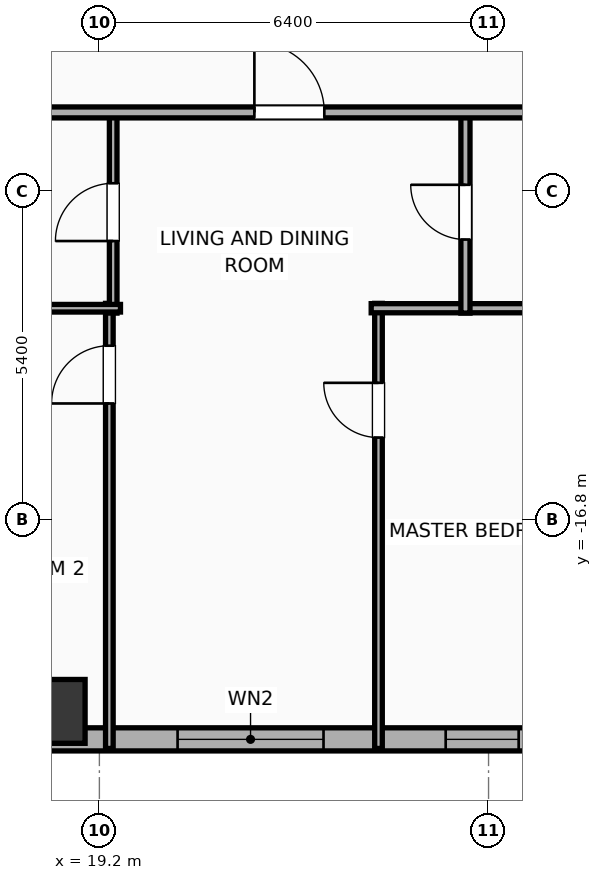
"""IFC4 building model, lengths in metres.
Left out: names, types, materials, properties, quantities, classifications, styles, units other than length and angle.
Written with IfcOpenShell. Run it as: python <this file> out.ifc"""

import sys

from ifc_helpers import new_model, si_unit, direction, frame, frame_2d, origin, origin_2d, place, context, subcontext, project, spatial, rectangle, hollow_rectangle, extrude, element, fill, save


model = new_model("IFC4")
c1 = context("Model", 3, precision=1e-05, world=origin(), true_north=direction((0.0, 1.0)))
c2 = subcontext(c1, "Body", "Model", "MODEL_VIEW")
j1 = project(units=[si_unit("LENGTHUNIT", "METRE"), si_unit("PLANEANGLEUNIT", "RADIAN")], contexts=[c1])
p1 = place(None, origin())
s1 = spatial("IfcSite", under=j1, at=p1, CompositionType="ELEMENT")
p2 = place(p1, origin())
s2 = spatial("IfcBuilding", under=s1, at=p2, CompositionType="ELEMENT")
p3 = place(p2, frame((0.0, 0.0, 105.3)))
s3 = spatial("IfcBuildingStorey", under=s2, at=p3, CompositionType="ELEMENT", Elevation=105.3)
p4 = place(p3, frame((18.44, -19.95, 0.0), z_axis=(0.0, 0.0, 1.0), x_axis=(1.0, 0.0, 0.0)))
e1 = element("IfcColumn", 1, at=p4, inside=s3, PredefinedType="COLUMN", context=c2, shape_type="SweptSolid", body=[
    extrude(hollow_rectangle(XDim=1.05, YDim=1.05, WallThickness=0.036, at=origin_2d()), origin(), (0.0, 0.0, 1.0), 3.9),
])
p5 = place(p3, frame((29.381, -20.41, 0.0), z_axis=(0.0, 0.0, 1.0), x_axis=(-1.0, 0.0, 0.0)))
e2 = element("IfcWall", 2, at=p5, inside=s3, PredefinedType="ELEMENTEDWALL", context=c2, shape_type="SweptSolid", body=[
    extrude(rectangle(XDim=54.763, YDim=0.38, at=frame_2d((27.381, 0.0))), origin(), (0.0, 0.0, 1.0), 3.65),
])
p6 = place(p5, frame((6.495, 0.0, 0.75)))
e3 = element("IfcOpeningElement", 3, at=p6, cuts=e2, PredefinedType="OPENING", context=c2, shape_type="SweptSolid", body=[
    extrude(rectangle(XDim=2.4, YDim=2.1, at=frame_2d((1.2, 1.05))), frame((0.0, 0.2, 0.0), z_axis=(0.0, -1.0, 0.0), x_axis=(1.0, 0.0, 0.0)), (0.0, 0.0, 1.0), 0.4),
])
p7 = place(p5, frame((17.686, 0.0, 0.75)))
e4 = element("IfcOpeningElement", 4, at=p7, cuts=e2, PredefinedType="OPENING", context=c2, shape_type="SweptSolid", body=[
    extrude(rectangle(XDim=2.4, YDim=2.1, at=frame_2d((1.2, 1.05))), frame((0.0, 0.2, 0.0), z_axis=(0.0, -1.0, 0.0), x_axis=(1.0, 0.0, 0.0)), (0.0, 0.0, 1.0), 0.4),
])
p8 = place(p5, frame((34.677, 0.0, 0.75)))
e5 = element("IfcOpeningElement", 5, at=p8, cuts=e2, PredefinedType="OPENING", context=c2, shape_type="SweptSolid", body=[
    extrude(rectangle(XDim=2.4, YDim=2.1, at=frame_2d((1.2, 1.05))), frame((0.0, 0.2, 0.0), z_axis=(0.0, -1.0, 0.0), x_axis=(1.0, 0.0, 0.0)), (0.0, 0.0, 1.0), 0.4),
])
p9 = place(p5, frame((45.867, 0.0, 0.75)))
e6 = element("IfcOpeningElement", 6, at=p9, cuts=e2, PredefinedType="OPENING", context=c2, shape_type="SweptSolid", body=[
    extrude(rectangle(XDim=2.4, YDim=2.1, at=frame_2d((1.2, 1.05))), frame((0.0, 0.2, 0.0), z_axis=(0.0, -1.0, 0.0), x_axis=(1.0, 0.0, 0.0)), (0.0, 0.0, 1.0), 0.4),
])
p10 = place(p5, frame((52.281, 0.0, 0.75)))
e7 = element("IfcOpeningElement", 7, at=p10, cuts=e2, PredefinedType="OPENING", context=c2, shape_type="SweptSolid", body=[
    extrude(rectangle(XDim=1.2, YDim=2.05, at=frame_2d((0.6, 1.025))), frame((0.0, 0.2, 0.0), z_axis=(0.0, -1.0, 0.0), x_axis=(1.0, 0.0, 0.0)), (0.0, 0.0, 1.0), 0.4),
])
p11 = place(p5, frame((49.641, 0.0, 0.75)))
e8 = element("IfcOpeningElement", 8, at=p11, cuts=e2, PredefinedType="OPENING", context=c2, shape_type="SweptSolid", body=[
    extrude(rectangle(XDim=1.2, YDim=2.05, at=frame_2d((0.6, 1.025))), frame((0.0, 0.2, 0.0), z_axis=(0.0, -1.0, 0.0), x_axis=(1.0, 0.0, 0.0)), (0.0, 0.0, 1.0), 0.4),
])
p12 = place(p5, frame((39.543, 0.0, 0.75)))
e9 = element("IfcOpeningElement", 9, at=p12, cuts=e2, PredefinedType="OPENING", context=c2, shape_type="SweptSolid", body=[
    extrude(rectangle(XDim=1.2, YDim=2.05, at=frame_2d((0.6, 1.025))), frame((0.0, 0.2, 0.0), z_axis=(0.0, -1.0, 0.0), x_axis=(1.0, 0.0, 0.0)), (0.0, 0.0, 1.0), 0.4),
])
p13 = place(p5, frame((44.538, 0.0, 0.75)))
e10 = element("IfcOpeningElement", 10, at=p13, cuts=e2, PredefinedType="OPENING", context=c2, shape_type="SweptSolid", body=[
    extrude(rectangle(XDim=0.52, YDim=2.05, at=frame_2d((0.26, 1.025))), frame((0.0, 0.2, 0.0), z_axis=(0.0, -1.0, 0.0), x_axis=(1.0, 0.0, 0.0)), (0.0, 0.0, 1.0), 0.4),
])
p14 = place(p5, frame((28.206, 0.0, 0.75)))
e11 = element("IfcOpeningElement", 11, at=p14, cuts=e2, PredefinedType="OPENING", context=c2, shape_type="SweptSolid", body=[
    extrude(rectangle(XDim=1.2, YDim=2.05, at=frame_2d((0.6, 1.025))), frame((0.0, 0.2, 0.0), z_axis=(0.0, -1.0, 0.0), x_axis=(1.0, 0.0, 0.0)), (0.0, 0.0, 1.0), 0.4),
])
p15 = place(p5, frame((31.241, 0.0, 0.75)))
e12 = element("IfcOpeningElement", 12, at=p15, cuts=e2, PredefinedType="OPENING", context=c2, shape_type="SweptSolid", body=[
    extrude(rectangle(XDim=0.85, YDim=2.05, at=frame_2d((0.425, 1.025))), frame((0.0, 0.2, 0.0), z_axis=(0.0, -1.0, 0.0), x_axis=(1.0, 0.0, 0.0)), (0.0, 0.0, 1.0), 0.4),
])
p16 = place(p5, frame((24.561, 0.0, 0.75)))
e13 = element("IfcOpeningElement", 13, at=p16, cuts=e2, PredefinedType="OPENING", context=c2, shape_type="SweptSolid", body=[
    extrude(rectangle(XDim=1.2, YDim=2.05, at=frame_2d((0.6, 1.025))), frame((0.0, 0.2, 0.0), z_axis=(0.0, -1.0, 0.0), x_axis=(1.0, 0.0, 0.0)), (0.0, 0.0, 1.0), 0.4),
])
p17 = place(p5, frame((22.561, 0.0, 0.75)))
e14 = element("IfcOpeningElement", 14, at=p17, cuts=e2, PredefinedType="OPENING", context=c2, shape_type="SweptSolid", body=[
    extrude(rectangle(XDim=0.52, YDim=2.05, at=frame_2d((0.26, 1.025))), frame((0.0, 0.2, 0.0), z_axis=(0.0, -1.0, 0.0), x_axis=(1.0, 0.0, 0.0)), (0.0, 0.0, 1.0), 0.4),
])
p18 = place(p5, frame((13.886, 0.0, 0.75)))
e15 = element("IfcOpeningElement", 15, at=p18, cuts=e2, PredefinedType="OPENING", context=c2, shape_type="SweptSolid", body=[
    extrude(rectangle(XDim=1.2, YDim=2.05, at=frame_2d((0.6, 1.025))), frame((0.0, 0.2, 0.0), z_axis=(0.0, -1.0, 0.0), x_axis=(1.0, 0.0, 0.0)), (0.0, 0.0, 1.0), 0.4),
])
p19 = place(p5, frame((11.694, 0.0, 0.75)))
e16 = element("IfcOpeningElement", 16, at=p19, cuts=e2, PredefinedType="OPENING", context=c2, shape_type="SweptSolid", body=[
    extrude(rectangle(XDim=0.85, YDim=2.05, at=frame_2d((0.425, 1.025))), frame((0.0, 0.2, 0.0), z_axis=(0.0, -1.0, 0.0), x_axis=(1.0, 0.0, 0.0)), (0.0, 0.0, 1.0), 0.4),
])
p20 = place(p5, frame((3.286, 0.0, 0.75)))
e17 = element("IfcOpeningElement", 17, at=p20, cuts=e2, PredefinedType="OPENING", context=c2, shape_type="SweptSolid", body=[
    extrude(rectangle(XDim=1.2, YDim=2.05, at=frame_2d((0.6, 1.025))), frame((0.0, 0.2, 0.0), z_axis=(0.0, -1.0, 0.0), x_axis=(1.0, 0.0, 0.0)), (0.0, 0.0, 1.0), 0.4),
])
p21 = place(p5, frame((0.816, 0.0, 0.75)))
e18 = element("IfcOpeningElement", 18, at=p21, cuts=e2, PredefinedType="OPENING", context=c2, shape_type="SweptSolid", body=[
    extrude(rectangle(XDim=1.2, YDim=2.05, at=frame_2d((0.6, 1.025))), frame((0.0, 0.2, 0.0), z_axis=(0.0, -1.0, 0.0), x_axis=(1.0, 0.0, 0.0)), (0.0, 0.0, 1.0), 0.4),
])
p22 = place(p3, frame((19.364, -20.56, 0.0), z_axis=(0.0, 0.0, 1.0), x_axis=(0.0, 1.0, 0.0)))
e19 = element("IfcWall", 19, at=p22, inside=s3, PredefinedType="PARTITIONING", context=c2, shape_type="SweptSolid", body=[
    extrude(rectangle(XDim=7.32, YDim=0.125, at=frame_2d((3.66, 0.0))), origin(), (0.0, 0.0, 1.0), 3.65),
])
p23 = place(p22, frame((5.674, 0.0, 0.0)))
e20 = element("IfcOpeningElement", 20, at=p23, cuts=e19, PredefinedType="OPENING", context=c2, shape_type="SweptSolid", body=[
    extrude(rectangle(XDim=0.95, YDim=2.05, at=frame_2d((0.475, 1.025))), frame((0.0, 0.073, 0.0), z_axis=(0.0, -1.0, 0.0), x_axis=(1.0, 0.0, 0.0)), (0.0, 0.0, 1.0), 0.145),
])
p24 = place(p3, frame((23.79, -20.56, 0.0), z_axis=(0.0, 0.0, 1.0), x_axis=(0.0, 1.0, 0.0)))
e21 = element("IfcWall", 21, at=p24, inside=s3, PredefinedType="PARTITIONING", context=c2, shape_type="SweptSolid", body=[
    extrude(rectangle(XDim=7.32, YDim=0.125, at=frame_2d((3.66, 0.0))), origin(), (0.0, 0.0, 1.0), 3.65),
])
p25 = place(p24, frame((5.113, 0.0, 0.0)))
e22 = element("IfcOpeningElement", 22, at=p25, cuts=e21, PredefinedType="OPENING", context=c2, shape_type="SweptSolid", body=[
    extrude(rectangle(XDim=0.9, YDim=2.05, at=frame_2d((0.45, 1.025))), frame((0.0, 0.073, 0.0), z_axis=(0.0, -1.0, 0.0), x_axis=(1.0, 0.0, 0.0)), (0.0, 0.0, 1.0), 0.145),
])
p26 = place(p3, frame((23.67, -13.32, 0.0), z_axis=(0.0, 0.0, 1.0), x_axis=(1.0, 0.0, 0.0)))
e23 = element("IfcWall", 23, at=p26, inside=s3, PredefinedType="PLUMBINGWALL", context=c2, shape_type="SweptSolid", body=[
    extrude(rectangle(XDim=3.79, YDim=0.15, at=frame_2d((1.895, 0.0))), origin(), (0.0, 0.0, 1.0), 3.65),
])
p27 = place(p3, frame((19.427, -13.4, 0.0), z_axis=(0.0, 0.0, 1.0), x_axis=(0.0, 1.0, 0.0)))
e24 = element("IfcWall", 24, at=p27, inside=s3, PredefinedType="PARTITIONING", context=c2, shape_type="SweptSolid", body=[
    extrude(rectangle(XDim=3.32, YDim=0.125, at=frame_2d((1.66, 0.0))), origin(), (0.0, 0.0, 1.0), 3.65),
])
p28 = place(p27, frame((1.185, 0.0, 0.0)))
e25 = element("IfcOpeningElement", 25, at=p28, cuts=e24, PredefinedType="OPENING", context=c2, shape_type="SweptSolid", body=[
    extrude(rectangle(XDim=0.95, YDim=2.05, at=frame_2d((0.475, 1.025))), frame((0.0, 0.073, 0.0), z_axis=(0.0, -1.0, 0.0), x_axis=(1.0, 0.0, 0.0)), (0.0, 0.0, 1.0), 0.145),
])
p29 = place(p3, frame((16.525, -13.32, 0.0), z_axis=(0.0, 0.0, 1.0), x_axis=(1.0, 0.0, 0.0)))
e26 = element("IfcWall", 26, at=p29, inside=s3, PredefinedType="PARTITIONING", context=c2, shape_type="SweptSolid", body=[
    extrude(rectangle(XDim=3.022, YDim=0.125, at=frame_2d((1.511, 0.0))), origin(), (0.0, 0.0, 1.0), 3.65),
])
p30 = place(p3, frame((25.22, -13.4, 0.0), z_axis=(0.0, 0.0, 1.0), x_axis=(0.0, 1.0, 0.0)))
e27 = element("IfcWall", 27, at=p30, inside=s3, PredefinedType="PLUMBINGWALL", context=c2, shape_type="SweptSolid", body=[
    extrude(rectangle(XDim=3.32, YDim=0.15, at=frame_2d((1.66, 0.0))), origin(), (0.0, 0.0, 1.0), 3.65),
])
p31 = place(p30, frame((1.21, 0.0, 0.0)))
e28 = element("IfcOpeningElement", 28, at=p31, cuts=e27, PredefinedType="OPENING", context=c2, shape_type="SweptSolid", body=[
    extrude(rectangle(XDim=0.9, YDim=2.05, at=frame_2d((0.45, 1.025))), frame((0.0, 0.085, 0.0), z_axis=(0.0, -1.0, 0.0), x_axis=(1.0, 0.0, 0.0)), (0.0, 0.0, 1.0), 0.17),
])
p32 = place(p3, frame((-29.21, -10.1, 0.0), z_axis=(0.0, 0.0, 1.0), x_axis=(1.0, 0.0, 0.0)))
e29 = element("IfcWall", 29, at=p32, inside=s3, PredefinedType="PARTITIONING", context=c2, shape_type="SweptSolid", body=[
    extrude(rectangle(XDim=62.42, YDim=0.18, at=frame_2d((31.21, 0.0))), origin(), (0.0, 0.0, 1.0), 3.65),
])
p33 = place(p32, frame((3.033, 0.0, 0.0)))
e30 = element("IfcOpeningElement", 30, at=p33, cuts=e29, PredefinedType="OPENING", context=c2, shape_type="SweptSolid", body=[
    extrude(rectangle(XDim=0.9, YDim=2.05, at=frame_2d((0.45, 1.025))), frame((0.0, 0.1, 0.0), z_axis=(0.0, -1.0, 0.0), x_axis=(1.0, 0.0, 0.0)), (0.0, 0.0, 1.0), 0.2),
])
p34 = place(p32, frame((9.768, 0.0, 0.0)))
e31 = element("IfcOpeningElement", 31, at=p34, cuts=e29, PredefinedType="OPENING", context=c2, shape_type="SweptSolid", body=[
    extrude(rectangle(XDim=0.9, YDim=2.05, at=frame_2d((0.45, 1.025))), frame((0.0, 0.1, 0.0), z_axis=(0.0, -1.0, 0.0), x_axis=(1.0, 0.0, 0.0)), (0.0, 0.0, 1.0), 0.2),
])
p35 = place(p32, frame((18.65, 0.0, 0.0)))
e32 = element("IfcOpeningElement", 32, at=p35, cuts=e29, PredefinedType="OPENING", context=c2, shape_type="SweptSolid", body=[
    extrude(rectangle(XDim=1.15, YDim=2.05, at=frame_2d((0.575, 1.025))), frame((0.0, 0.1, 0.0), z_axis=(0.0, -1.0, 0.0), x_axis=(1.0, 0.0, 0.0)), (0.0, 0.0, 1.0), 0.2),
])
p36 = place(p32, frame((29.212, 0.0, 0.0)))
e33 = element("IfcOpeningElement", 33, at=p36, cuts=e29, PredefinedType="OPENING", context=c2, shape_type="SweptSolid", body=[
    extrude(rectangle(XDim=1.15, YDim=2.05, at=frame_2d((0.575, 1.025))), frame((0.0, 0.1, 0.0), z_axis=(0.0, -1.0, 0.0), x_axis=(1.0, 0.0, 0.0)), (0.0, 0.0, 1.0), 0.2),
])
p37 = place(p32, frame((40.379, 0.0, 0.0)))
e34 = element("IfcOpeningElement", 34, at=p37, cuts=e29, PredefinedType="OPENING", context=c2, shape_type="SweptSolid", body=[
    extrude(rectangle(XDim=1.15, YDim=2.05, at=frame_2d((0.575, 1.025))), frame((0.0, 0.1, 0.0), z_axis=(0.0, -1.0, 0.0), x_axis=(1.0, 0.0, 0.0)), (0.0, 0.0, 1.0), 0.2),
])
p38 = place(p32, frame((50.959, 0.0, 0.0)))
e35 = element("IfcOpeningElement", 35, at=p38, cuts=e29, PredefinedType="OPENING", context=c2, shape_type="SweptSolid", body=[
    extrude(rectangle(XDim=1.15, YDim=2.05, at=frame_2d((0.575, 1.025))), frame((0.0, 0.1, 0.0), z_axis=(0.0, -1.0, 0.0), x_axis=(1.0, 0.0, 0.0)), (0.0, 0.0, 1.0), 0.2),
])
p39 = place(p32, frame((59.117, 0.0, 0.0)))
e36 = element("IfcOpeningElement", 36, at=p39, cuts=e29, PredefinedType="OPENING", context=c2, shape_type="SweptSolid", body=[
    extrude(rectangle(XDim=0.9, YDim=2.05, at=frame_2d((0.45, 1.025))), frame((0.0, 0.1, 0.0), z_axis=(0.0, -1.0, 0.0), x_axis=(1.0, 0.0, 0.0)), (0.0, 0.0, 1.0), 0.2),
])
p40 = place(p6, origin())
e37 = element("IfcWindow", 37, at=p40, inside=s3, PartitioningType="SINGLE_PANEL", PredefinedType="WINDOW", context=c2, shape_type="SweptSolid", body=[
    extrude(rectangle(XDim=2.4, YDim=2.1, at=frame_2d((1.2, 1.05))), frame((0.0, 0.03, 0.0), z_axis=(0.0, -1.0, 0.0), x_axis=(1.0, 0.0, 0.0)), (0.0, 0.0, 1.0), 0.06),
])
fill(e3, e37)
p41 = place(p20, origin())
e38 = element("IfcWindow", 38, at=p41, inside=s3, PartitioningType="SINGLE_PANEL", PredefinedType="WINDOW", context=c2, shape_type="SweptSolid", body=[
    extrude(rectangle(XDim=1.2, YDim=2.05, at=frame_2d((0.6, 1.025))), frame((0.0, 0.03, 0.0), z_axis=(0.0, -1.0, 0.0), x_axis=(1.0, 0.0, 0.0)), (0.0, 0.0, 1.0), 0.06),
])
fill(e17, e38)
p42 = place(p23, origin())
e39 = element("IfcDoor", 39, at=p42, inside=s3, OperationType="SINGLE_SWING_LEFT", PredefinedType="DOOR", context=c2, shape_type="SweptSolid", body=[
    extrude(rectangle(XDim=0.95, YDim=2.05, at=frame_2d((0.475, 1.025))), frame((0.0, 0.025, 0.0), z_axis=(0.0, -1.0, 0.0), x_axis=(1.0, 0.0, 0.0)), (0.0, 0.0, 1.0), 0.05),
])
fill(e20, e39)
p43 = place(p25, origin())
e40 = element("IfcDoor", 40, at=p43, inside=s3, OperationType="SINGLE_SWING_RIGHT", PredefinedType="DOOR", context=c2, shape_type="SweptSolid", body=[
    extrude(rectangle(XDim=0.9, YDim=2.05, at=frame_2d((0.45, 1.025))), frame((0.0, 0.025, 0.0), z_axis=(0.0, -1.0, 0.0), x_axis=(1.0, 0.0, 0.0)), (0.0, 0.0, 1.0), 0.05),
])
fill(e22, e40)
p44 = place(p28, origin())
e41 = element("IfcDoor", 41, at=p44, inside=s3, OperationType="SINGLE_SWING_LEFT", PredefinedType="DOOR", context=c2, shape_type="SweptSolid", body=[
    extrude(rectangle(XDim=0.95, YDim=2.05, at=frame_2d((0.475, 1.025))), frame((0.0, 0.025, 0.0), z_axis=(0.0, -1.0, 0.0), x_axis=(1.0, 0.0, 0.0)), (0.0, 0.0, 1.0), 0.05),
])
fill(e25, e41)
p45 = place(p31, origin())
e42 = element("IfcDoor", 42, at=p45, inside=s3, OperationType="SINGLE_SWING_RIGHT", PredefinedType="DOOR", context=c2, shape_type="SweptSolid", body=[
    extrude(rectangle(XDim=0.9, YDim=2.05, at=frame_2d((0.45, 1.025))), frame((0.0, 0.025, 0.0), z_axis=(0.0, -1.0, 0.0), x_axis=(1.0, 0.0, 0.0)), (0.0, 0.0, 1.0), 0.05),
])
fill(e28, e42)
p46 = place(p38, origin())
e43 = element("IfcDoor", 43, at=p46, inside=s3, OperationType="SINGLE_SWING_LEFT", PredefinedType="DOOR", context=c2, shape_type="SweptSolid", body=[
    extrude(rectangle(XDim=1.15, YDim=2.05, at=frame_2d((0.575, 1.025))), frame((0.0, 0.025, 0.0), z_axis=(0.0, -1.0, 0.0), x_axis=(1.0, 0.0, 0.0)), (0.0, 0.0, 1.0), 0.05),
])
fill(e35, e43)
save(model, sys.argv[1])
